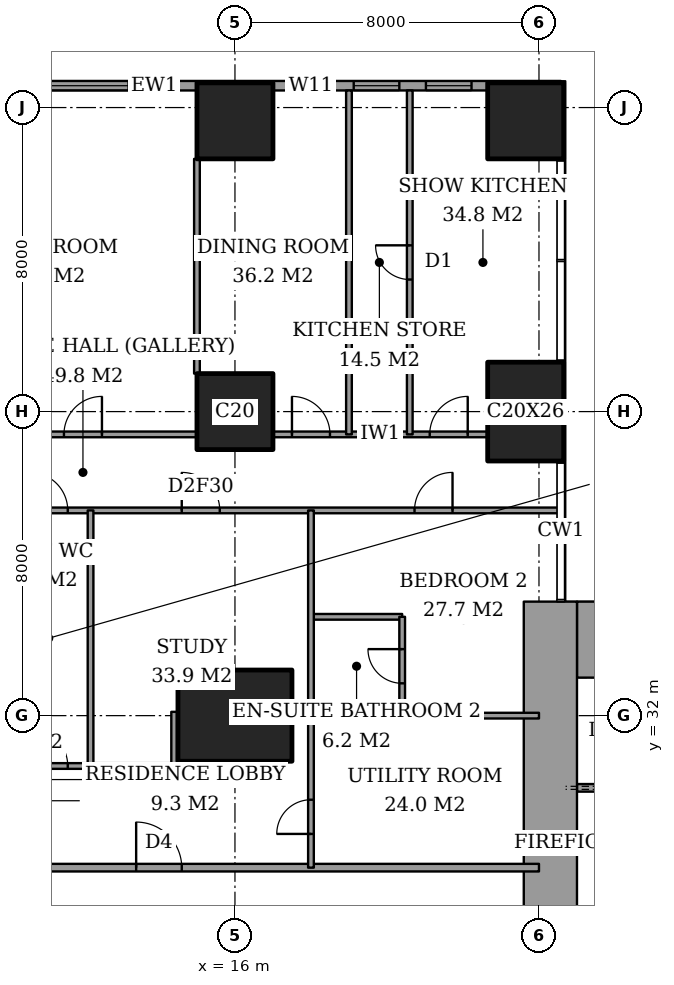
"""IFC4 building model, lengths in metres.
Left out: names, types, materials, properties, quantities, classifications, styles, units other than length and angle.
Written with IfcOpenShell. Run it as: python <this file> out.ifc"""

import sys

from ifc_helpers import new_model, si_unit, direction, frame, frame_2d, origin, origin_2d, place, context, subcontext, project, spatial, rectangle, extrude, element, fill, save


model = new_model("IFC4")
c1 = context("Model", 3, precision=1e-05, world=origin(), true_north=direction((0.0, 1.0)))
c2 = subcontext(c1, "Body", "Model", "MODEL_VIEW")
j1 = project(units=[si_unit("LENGTHUNIT", "METRE"), si_unit("PLANEANGLEUNIT", "RADIAN")], contexts=[c1])
p1 = place(None, origin())
s1 = spatial("IfcSite", under=j1, at=p1, CompositionType="ELEMENT")
p2 = place(p1, origin())
s2 = spatial("IfcBuilding", under=s1, at=p2, CompositionType="ELEMENT")
p3 = place(p2, frame((0.0, 0.0, 139.4)))
s3 = spatial("IfcBuildingStorey", under=s2, at=p3, CompositionType="ELEMENT", Elevation=139.4)
p4 = place(p3, frame((16.0, 32.0, 0.0), z_axis=(0.0, 0.0, 1.0), x_axis=(1.0, 0.0, 0.0)))
e1 = element("IfcColumn", 1, at=p4, inside=s3, PredefinedType="COLUMN", context=c2, shape_type="SweptSolid", body=[
    extrude(rectangle(XDim=3.0, YDim=2.4, at=origin_2d()), origin(), (0.0, 0.0, 1.0), 3.6),
])
for number, where, z_axis, x_axis in (
    (2, (16.0, 40.0, 0.0), (0.0, 0.0, 1.0), (1.0, 0.0, 0.0)),
    (3, (16.0, 47.65, 0.0), (0.0, 0.0, 1.0), (1.0, 0.0, 0.0)),
):
    element("IfcColumn", number, at=place(p3, frame(where, z_axis=z_axis, x_axis=x_axis)), inside=s3, PredefinedType="COLUMN", context=c2, shape_type="SweptSolid", body=[
        extrude(rectangle(XDim=2.0, YDim=2.0, at=origin_2d()), origin(), (0.0, 0.0, 1.0), 3.6),
    ])
p5 = place(p3, frame((23.65, 40.0, 0.0), z_axis=(0.0, 0.0, 1.0), x_axis=(1.0, 0.0, 0.0)))
e4 = element("IfcColumn", 4, at=p5, inside=s3, PredefinedType="COLUMN", context=c2, shape_type="SweptSolid", body=[
    extrude(rectangle(XDim=2.0, YDim=2.6, at=origin_2d()), origin(), (0.0, 0.0, 1.0), 3.6),
])
p6 = place(p3, frame((23.65, 47.65, 0.0), z_axis=(0.0, 0.0, 1.0), x_axis=(1.0, 0.0, 0.0)))
e5 = element("IfcColumn", 5, at=p6, inside=s3, PredefinedType="COLUMN", context=c2, shape_type="SweptSolid", body=[
    extrude(rectangle(XDim=2.0, YDim=2.0, at=origin_2d()), origin(), (0.0, 0.0, 1.0), 3.6),
])
p7 = place(p3, frame((25.0, 34.0, 0.0), z_axis=(0.0, 0.0, 1.0), x_axis=(1.0, 0.0, 0.0)))
e6 = element("IfcWall", 6, at=p7, inside=s3, PredefinedType="SHEAR", context=c2, shape_type="SweptSolid", body=[
    extrude(rectangle(XDim=3.15, YDim=2.0, at=frame_2d((1.575, 0.0))), origin(), (0.0, 0.0, 1.0), 3.6),
])
p8 = place(p3, frame((24.3, 23.15, 0.0), z_axis=(0.0, 0.0, 1.0), x_axis=(0.0, 1.0, 0.0)))
e7 = element("IfcWall", 7, at=p8, inside=s3, PredefinedType="SHEAR", context=c2, shape_type="SweptSolid", body=[
    extrude(rectangle(XDim=11.85, YDim=1.4, at=frame_2d((5.925, 0.0))), origin(), (0.0, 0.0, 1.0), 3.6),
])
p9 = place(p8, frame((0.75, 0.0, 0.0)))
e8 = element("IfcOpeningElement", 8, at=p9, cuts=e7, PredefinedType="OPENING", context=c2, shape_type="SweptSolid", body=[
    extrude(rectangle(XDim=1.8, YDim=2.4, at=frame_2d((0.9, 1.2))), frame((0.0, 0.71, 0.0), z_axis=(0.0, -1.0, 0.0), x_axis=(1.0, 0.0, 0.0)), (0.0, 0.0, 1.0), 1.42),
])
p10 = place(p3, frame((24.575, 48.575, 0.0), z_axis=(0.0, 0.0, 1.0), x_axis=(-1.0, 0.0, 0.0)))
e9 = element("IfcWall", 9, at=p10, inside=s3, PredefinedType="SOLIDWALL", context=c2, shape_type="SweptSolid", body=[
    extrude(rectangle(XDim=21.4, YDim=0.25, at=frame_2d((10.7, 0.0))), origin(), (0.0, 0.0, 1.0), 3.6),
])
p11 = place(p10, frame((2.35, 0.0, 0.4)))
e10 = element("IfcOpeningElement", 10, at=p11, cuts=e9, PredefinedType="OPENING", context=c2, shape_type="SweptSolid", body=[
    extrude(rectangle(XDim=1.2, YDim=2.2, at=frame_2d((0.6, 1.1))), frame((0.0, 0.135, 0.0), z_axis=(0.0, -1.0, 0.0), x_axis=(1.0, 0.0, 0.0)), (0.0, 0.0, 1.0), 0.27),
])
p12 = place(p10, frame((4.25, 0.0, 0.4)))
e11 = element("IfcOpeningElement", 11, at=p12, cuts=e9, PredefinedType="OPENING", context=c2, shape_type="SweptSolid", body=[
    extrude(rectangle(XDim=1.2, YDim=2.2, at=frame_2d((0.6, 1.1))), frame((0.0, 0.135, 0.0), z_axis=(0.0, -1.0, 0.0), x_axis=(1.0, 0.0, 0.0)), (0.0, 0.0, 1.0), 0.27),
])
p13 = place(p10, frame((5.975, 0.0, 0.4)))
e12 = element("IfcOpeningElement", 12, at=p13, cuts=e9, PredefinedType="OPENING", context=c2, shape_type="SweptSolid", body=[
    extrude(rectangle(XDim=1.2, YDim=2.2, at=frame_2d((0.6, 1.1))), frame((0.0, 0.135, 0.0), z_axis=(0.0, -1.0, 0.0), x_axis=(1.0, 0.0, 0.0)), (0.0, 0.0, 1.0), 0.27),
])
p14 = place(p10, frame((11.375, 0.0, 0.4)))
e13 = element("IfcOpeningElement", 13, at=p14, cuts=e9, PredefinedType="OPENING", context=c2, shape_type="SweptSolid", body=[
    extrude(rectangle(XDim=2.4, YDim=2.2, at=frame_2d((1.2, 1.1))), frame((0.0, 0.135, 0.0), z_axis=(0.0, -1.0, 0.0), x_axis=(1.0, 0.0, 0.0)), (0.0, 0.0, 1.0), 0.27),
])
p15 = place(p10, frame((18.225, 0.0, 0.4)))
e14 = element("IfcOpeningElement", 14, at=p15, cuts=e9, PredefinedType="OPENING", context=c2, shape_type="SweptSolid", body=[
    extrude(rectangle(XDim=2.4, YDim=2.2, at=frame_2d((1.2, 1.1))), frame((0.0, 0.135, 0.0), z_axis=(0.0, -1.0, 0.0), x_axis=(1.0, 0.0, 0.0)), (0.0, 0.0, 1.0), 0.27),
])
p16 = place(p3, frame((6.725, 28.0, 0.0), z_axis=(0.0, 0.0, 1.0), x_axis=(1.0, 0.0, 0.0)))
e15 = element("IfcWall", 15, at=p16, inside=s3, PredefinedType="PARTITIONING", context=c2, shape_type="SweptSolid", body=[
    extrude(rectangle(XDim=17.275, YDim=0.2, at=frame_2d((8.637, 0.0))), origin(), (0.0, 0.0, 1.0), 3.35),
])
p17 = place(p16, frame((6.675, 0.0, 0.0)))
e16 = element("IfcOpeningElement", 16, at=p17, cuts=e15, PredefinedType="OPENING", context=c2, shape_type="SweptSolid", body=[
    extrude(rectangle(XDim=1.2, YDim=2.4, at=frame_2d((0.6, 1.2))), frame((0.0, 0.11, 0.0), z_axis=(0.0, -1.0, 0.0), x_axis=(1.0, 0.0, 0.0)), (0.0, 0.0, 1.0), 0.22),
])
p18 = place(p3, frame((10.0, 30.675, 0.0), z_axis=(0.0, 0.0, 1.0), x_axis=(1.0, 0.0, 0.0)))
e17 = element("IfcWall", 17, at=p18, inside=s3, PredefinedType="PARTITIONING", context=c2, shape_type="SweptSolid", body=[
    extrude(rectangle(XDim=4.4, YDim=0.15, at=frame_2d((2.2, 0.0))), origin(), (0.0, 0.0, 1.0), 3.35),
])
p19 = place(p18, frame((0.6, 0.0, 0.0)))
e18 = element("IfcOpeningElement", 18, at=p19, cuts=e17, PredefinedType="OPENING", context=c2, shape_type="SweptSolid", body=[
    extrude(rectangle(XDim=1.0, YDim=2.1, at=frame_2d((0.5, 1.05))), frame((0.0, 0.085, 0.0), z_axis=(0.0, -1.0, 0.0), x_axis=(1.0, 0.0, 0.0)), (0.0, 0.0, 1.0), 0.17),
])
p20 = place(p3, frame((18.0, 32.0, 0.0), z_axis=(0.0, 0.0, 1.0), x_axis=(1.0, 0.0, 0.0)))
e19 = element("IfcWall", 19, at=p20, inside=s3, PredefinedType="PARTITIONING", context=c2, shape_type="SweptSolid", body=[
    extrude(rectangle(XDim=6.0, YDim=0.15, at=frame_2d((3.0, 0.0))), origin(), (0.0, 0.0, 1.0), 2.634),
])
p21 = place(p3, frame((17.5, 32.1, 0.0), z_axis=(0.0, 0.0, 1.0), x_axis=(1.0, 0.0, 0.0)))
e20 = element("IfcWall", 20, at=p21, inside=s3, PredefinedType="PARTITIONING", context=c2, shape_type="SweptSolid", body=[
    extrude(rectangle(XDim=0.5, YDim=0.15, at=frame_2d((0.25, 0.0))), origin(), (0.0, 0.0, 1.0), 2.634),
])
p22 = place(p3, frame((18.0, 34.6, 0.0), z_axis=(0.0, 0.0, 1.0), x_axis=(1.0, 0.0, 0.0)))
e21 = element("IfcWall", 21, at=p22, inside=s3, PredefinedType="PARTITIONING", context=c2, shape_type="SweptSolid", body=[
    extrude(rectangle(XDim=2.4, YDim=0.15, at=frame_2d((1.2, 0.0))), origin(), (0.0, 0.0, 1.0), 3.35),
])
p23 = place(p3, frame((10.0, 37.4, 0.0), z_axis=(0.0, 0.0, 1.0), x_axis=(1.0, 0.0, 0.0)))
e22 = element("IfcWall", 22, at=p23, inside=s3, PredefinedType="PARTITIONING", context=c2, shape_type="SweptSolid", body=[
    extrude(rectangle(XDim=14.561, YDim=0.15, at=frame_2d((7.281, 0.0))), origin(), (0.0, 0.0, 1.0), 3.35),
])
p24 = place(p23, frame((0.6, 0.0, 0.0)))
e23 = element("IfcOpeningElement", 23, at=p24, cuts=e22, PredefinedType="OPENING", context=c2, shape_type="SweptSolid", body=[
    extrude(rectangle(XDim=1.0, YDim=2.1, at=frame_2d((0.5, 1.05))), frame((0.0, 0.085, 0.0), z_axis=(0.0, -1.0, 0.0), x_axis=(1.0, 0.0, 0.0)), (0.0, 0.0, 1.0), 0.17),
])
p25 = place(p23, frame((4.6, 0.0, 0.0)))
e24 = element("IfcOpeningElement", 24, at=p25, cuts=e22, PredefinedType="OPENING", context=c2, shape_type="SweptSolid", body=[
    extrude(rectangle(XDim=1.0, YDim=2.1, at=frame_2d((0.5, 1.05))), frame((0.0, 0.085, 0.0), z_axis=(0.0, -1.0, 0.0), x_axis=(1.0, 0.0, 0.0)), (0.0, 0.0, 1.0), 0.17),
])
p26 = place(p23, frame((10.725, 0.0, 0.0)))
e25 = element("IfcOpeningElement", 25, at=p26, cuts=e22, PredefinedType="OPENING", context=c2, shape_type="SweptSolid", body=[
    extrude(rectangle(XDim=1.0, YDim=2.1, at=frame_2d((0.5, 1.05))), frame((0.0, 0.085, 0.0), z_axis=(0.0, -1.0, 0.0), x_axis=(1.0, 0.0, 0.0)), (0.0, 0.0, 1.0), 0.17),
])
p27 = place(p3, frame((9.0, 39.4, 0.0), z_axis=(0.0, 0.0, 1.0), x_axis=(1.0, 0.0, 0.0)))
e26 = element("IfcWall", 26, at=p27, inside=s3, PredefinedType="PARTITIONING", context=c2, shape_type="SweptSolid", body=[
    extrude(rectangle(XDim=6.0, YDim=0.15, at=frame_2d((3.0, 0.0))), origin(), (0.0, 0.0, 1.0), 3.35),
])
p28 = place(p27, frame((2.5, 0.0, 0.0)))
e27 = element("IfcOpeningElement", 27, at=p28, cuts=e26, PredefinedType="OPENING", context=c2, shape_type="SweptSolid", body=[
    extrude(rectangle(XDim=1.0, YDim=2.1, at=frame_2d((0.5, 1.05))), frame((0.0, 0.085, 0.0), z_axis=(0.0, -1.0, 0.0), x_axis=(1.0, 0.0, 0.0)), (0.0, 0.0, 1.0), 0.17),
])
p29 = place(p3, frame((17.0, 39.4, 0.0), z_axis=(0.0, 0.0, 1.0), x_axis=(1.0, 0.0, 0.0)))
e28 = element("IfcWall", 28, at=p29, inside=s3, PredefinedType="PARTITIONING", context=c2, shape_type="SweptSolid", body=[
    extrude(rectangle(XDim=5.65, YDim=0.15, at=frame_2d((2.825, 0.0))), origin(), (0.0, 0.0, 1.0), 3.35),
])
p30 = place(p29, frame((0.5, 0.0, 0.0)))
e29 = element("IfcOpeningElement", 29, at=p30, cuts=e28, PredefinedType="OPENING", context=c2, shape_type="SweptSolid", body=[
    extrude(rectangle(XDim=1.0, YDim=2.1, at=frame_2d((0.5, 1.05))), frame((0.0, 0.085, 0.0), z_axis=(0.0, -1.0, 0.0), x_axis=(1.0, 0.0, 0.0)), (0.0, 0.0, 1.0), 0.17),
])
p31 = place(p29, frame((4.125, 0.0, 0.0)))
e30 = element("IfcOpeningElement", 30, at=p31, cuts=e28, PredefinedType="OPENING", context=c2, shape_type="SweptSolid", body=[
    extrude(rectangle(XDim=1.0, YDim=2.1, at=frame_2d((0.5, 1.05))), frame((0.0, 0.085, 0.0), z_axis=(0.0, -1.0, 0.0), x_axis=(1.0, 0.0, 0.0)), (0.0, 0.0, 1.0), 0.17),
])
p32 = place(p3, frame((12.2, 30.675, 0.0), z_axis=(0.0, 0.0, 1.0), x_axis=(0.0, 1.0, 0.0)))
e31 = element("IfcWall", 31, at=p32, inside=s3, PredefinedType="PARTITIONING", context=c2, shape_type="SweptSolid", body=[
    extrude(rectangle(XDim=6.725, YDim=0.15, at=frame_2d((3.362, 0.0))), origin(), (0.0, 0.0, 1.0), 3.35),
])
p33 = place(p3, frame((14.4, 30.675, 0.0), z_axis=(0.0, 0.0, 1.0), x_axis=(0.0, 1.0, 0.0)))
e32 = element("IfcWall", 32, at=p33, inside=s3, PredefinedType="PARTITIONING", context=c2, shape_type="SweptSolid", body=[
    extrude(rectangle(XDim=1.425, YDim=0.15, at=frame_2d((0.712, 0.0))), origin(), (0.0, 0.0, 1.0), 3.35),
])
p34 = place(p3, frame((15.0, 41.0, 0.0), z_axis=(0.0, 0.0, 1.0), x_axis=(0.0, 1.0, 0.0)))
e33 = element("IfcWall", 33, at=p34, inside=s3, PredefinedType="PARTITIONING", context=c2, shape_type="SweptSolid", body=[
    extrude(rectangle(XDim=5.65, YDim=0.15, at=frame_2d((2.825, 0.0))), origin(), (0.0, 0.0, 1.0), 3.35),
])
p35 = place(p3, frame((18.0, 28.0, 0.0), z_axis=(0.0, 0.0, 1.0), x_axis=(0.0, 1.0, 0.0)))
e34 = element("IfcWall", 34, at=p35, inside=s3, PredefinedType="PARTITIONING", context=c2, shape_type="SweptSolid", body=[
    extrude(rectangle(XDim=9.4, YDim=0.15, at=frame_2d((4.7, 0.0))), origin(), (0.0, 0.0, 1.0), 3.35),
])
p36 = place(p35, frame((0.887, 0.0, 0.0)))
e35 = element("IfcOpeningElement", 35, at=p36, cuts=e34, PredefinedType="OPENING", context=c2, shape_type="SweptSolid", body=[
    extrude(rectangle(XDim=0.9, YDim=2.1, at=frame_2d((0.45, 1.05))), frame((0.0, 0.085, 0.0), z_axis=(0.0, -1.0, 0.0), x_axis=(1.0, 0.0, 0.0)), (0.0, 0.0, 1.0), 0.17),
])
p37 = place(p3, frame((19.0, 39.4, 0.0), z_axis=(0.0, 0.0, 1.0), x_axis=(0.0, 1.0, 0.0)))
e36 = element("IfcWall", 36, at=p37, inside=s3, PredefinedType="PARTITIONING", context=c2, shape_type="SweptSolid", body=[
    extrude(rectangle(XDim=9.05, YDim=0.15, at=frame_2d((4.525, 0.0))), origin(), (0.0, 0.0, 1.0), 3.35),
])
p38 = place(p3, frame((20.4, 32.0, 0.0), z_axis=(0.0, 0.0, 1.0), x_axis=(0.0, 1.0, 0.0)))
e37 = element("IfcWall", 37, at=p38, inside=s3, PredefinedType="PARTITIONING", context=c2, shape_type="SweptSolid", body=[
    extrude(rectangle(XDim=2.6, YDim=0.15, at=frame_2d((1.3, 0.0))), origin(), (0.0, 0.0, 1.0), 3.35),
])
p39 = place(p38, frame((0.85, 0.0, 0.0)))
e38 = element("IfcOpeningElement", 38, at=p39, cuts=e37, PredefinedType="OPENING", context=c2, shape_type="SweptSolid", body=[
    extrude(rectangle(XDim=0.9, YDim=2.1, at=frame_2d((0.45, 1.05))), frame((0.0, 0.085, 0.0), z_axis=(0.0, -1.0, 0.0), x_axis=(1.0, 0.0, 0.0)), (0.0, 0.0, 1.0), 0.17),
])
p40 = place(p3, frame((20.6, 39.4, 0.0), z_axis=(0.0, 0.0, 1.0), x_axis=(0.0, 1.0, 0.0)))
e39 = element("IfcWall", 39, at=p40, inside=s3, PredefinedType="PARTITIONING", context=c2, shape_type="SweptSolid", body=[
    extrude(rectangle(XDim=9.05, YDim=0.15, at=frame_2d((4.525, 0.0))), origin(), (0.0, 0.0, 1.0), 3.35),
])
p41 = place(p40, frame((4.075, 0.0, 0.0)))
e40 = element("IfcOpeningElement", 40, at=p41, cuts=e39, PredefinedType="OPENING", context=c2, shape_type="SweptSolid", body=[
    extrude(rectangle(XDim=0.9, YDim=2.1, at=frame_2d((0.45, 1.05))), frame((0.0, 0.085, 0.0), z_axis=(0.0, -1.0, 0.0), x_axis=(1.0, 0.0, 0.0)), (0.0, 0.0, 1.0), 0.17),
])
p42 = place(p3, frame((25.0, 30.1, 0.0), z_axis=(0.0, 0.0, 1.0), x_axis=(1.0, 0.0, 0.0)))
e41 = element("IfcWall", 41, at=p42, inside=s3, PredefinedType="PARTITIONING", context=c2, shape_type="SweptSolid", body=[
    extrude(rectangle(XDim=12.7, YDim=0.2, at=frame_2d((6.35, 0.0))), origin(), (0.0, 0.0, 1.0), 3.6),
])
p43 = place(p42, frame((0.9, 0.0, 0.0)))
e42 = element("IfcOpeningElement", 42, at=p43, cuts=e41, PredefinedType="OPENING", context=c2, shape_type="SweptSolid", body=[
    extrude(rectangle(XDim=1.2, YDim=2.1, at=frame_2d((0.6, 1.05))), frame((0.0, 0.11, 0.0), z_axis=(0.0, -1.0, 0.0), x_axis=(1.0, 0.0, 0.0)), (0.0, 0.0, 1.0), 0.22),
])
p44 = place(p11, origin())
e43 = element("IfcWindow", 43, at=p44, inside=s3, PartitioningType="SINGLE_PANEL", PredefinedType="WINDOW", context=c2, shape_type="SweptSolid", body=[
    extrude(rectangle(XDim=1.2, YDim=2.2, at=frame_2d((0.6, 1.1))), frame((0.0, 0.03, 0.0), z_axis=(0.0, -1.0, 0.0), x_axis=(1.0, 0.0, 0.0)), (0.0, 0.0, 1.0), 0.06),
])
fill(e10, e43)
p45 = place(p12, origin())
e44 = element("IfcWindow", 44, at=p45, inside=s3, PartitioningType="SINGLE_PANEL", PredefinedType="WINDOW", context=c2, shape_type="SweptSolid", body=[
    extrude(rectangle(XDim=1.2, YDim=2.2, at=frame_2d((0.6, 1.1))), frame((0.0, 0.03, 0.0), z_axis=(0.0, -1.0, 0.0), x_axis=(1.0, 0.0, 0.0)), (0.0, 0.0, 1.0), 0.06),
])
fill(e11, e44)
p46 = place(p13, origin())
e45 = element("IfcWindow", 45, at=p46, inside=s3, PartitioningType="SINGLE_PANEL", PredefinedType="WINDOW", context=c2, shape_type="SweptSolid", body=[
    extrude(rectangle(XDim=1.2, YDim=2.2, at=frame_2d((0.6, 1.1))), frame((0.0, 0.03, 0.0), z_axis=(0.0, -1.0, 0.0), x_axis=(1.0, 0.0, 0.0)), (0.0, 0.0, 1.0), 0.06),
])
fill(e12, e45)
p47 = place(p14, origin())
e46 = element("IfcWindow", 46, at=p47, inside=s3, PartitioningType="SINGLE_PANEL", PredefinedType="WINDOW", context=c2, shape_type="SweptSolid", body=[
    extrude(rectangle(XDim=2.4, YDim=2.2, at=frame_2d((1.2, 1.1))), frame((0.0, 0.03, 0.0), z_axis=(0.0, -1.0, 0.0), x_axis=(1.0, 0.0, 0.0)), (0.0, 0.0, 1.0), 0.06),
])
fill(e13, e46)
p48 = place(p28, origin())
e47 = element("IfcDoor", 47, at=p48, inside=s3, OperationType="SINGLE_SWING_LEFT", PredefinedType="DOOR", context=c2, shape_type="SweptSolid", body=[
    extrude(rectangle(XDim=1.0, YDim=2.1, at=frame_2d((0.5, 1.05))), frame((0.0, 0.025, 0.0), z_axis=(0.0, -1.0, 0.0), x_axis=(1.0, 0.0, 0.0)), (0.0, 0.0, 1.0), 0.05),
])
fill(e27, e47)
p49 = place(p30, origin())
e48 = element("IfcDoor", 48, at=p49, inside=s3, OperationType="SINGLE_SWING_RIGHT", PredefinedType="DOOR", context=c2, shape_type="SweptSolid", body=[
    extrude(rectangle(XDim=1.0, YDim=2.1, at=frame_2d((0.5, 1.05))), frame((0.0, 0.025, 0.0), z_axis=(0.0, -1.0, 0.0), x_axis=(1.0, 0.0, 0.0)), (0.0, 0.0, 1.0), 0.05),
])
fill(e29, e48)
p50 = place(p41, origin())
e49 = element("IfcDoor", 49, at=p50, inside=s3, OperationType="SINGLE_SWING_LEFT", PredefinedType="DOOR", context=c2, shape_type="SweptSolid", body=[
    extrude(rectangle(XDim=0.9, YDim=2.1, at=frame_2d((0.45, 1.05))), frame((0.0, 0.025, 0.0), z_axis=(0.0, -1.0, 0.0), x_axis=(1.0, 0.0, 0.0)), (0.0, 0.0, 1.0), 0.05),
])
fill(e40, e49)
p51 = place(p31, origin())
e50 = element("IfcDoor", 50, at=p51, inside=s3, OperationType="SINGLE_SWING_LEFT", PredefinedType="DOOR", context=c2, shape_type="SweptSolid", body=[
    extrude(rectangle(XDim=1.0, YDim=2.1, at=frame_2d((0.5, 1.05))), frame((0.0, 0.025, 0.0), z_axis=(0.0, -1.0, 0.0), x_axis=(1.0, 0.0, 0.0)), (0.0, 0.0, 1.0), 0.05),
])
fill(e30, e50)
p52 = place(p24, origin())
e51 = element("IfcDoor", 51, at=p52, inside=s3, OperationType="SINGLE_SWING_RIGHT", PredefinedType="DOOR", context=c2, shape_type="SweptSolid", body=[
    extrude(rectangle(XDim=1.0, YDim=2.1, at=frame_2d((0.5, 1.05))), frame((0.0, 0.025, 0.0), z_axis=(0.0, -1.0, 0.0), x_axis=(1.0, 0.0, 0.0)), (0.0, 0.0, 1.0), 0.05),
])
fill(e23, e51)
p53 = place(p17, origin())
e52 = element("IfcDoor", 52, at=p53, inside=s3, OperationType="SINGLE_SWING_RIGHT", PredefinedType="DOOR", context=c2, shape_type="SweptSolid", body=[
    extrude(rectangle(XDim=1.2, YDim=2.4, at=frame_2d((0.6, 1.2))), frame((0.0, 0.025, 0.0), z_axis=(0.0, -1.0, 0.0), x_axis=(1.0, 0.0, 0.0)), (0.0, 0.0, 1.0), 0.05),
])
fill(e16, e52)
p54 = place(p19, origin())
e53 = element("IfcDoor", 53, at=p54, inside=s3, OperationType="SINGLE_SWING_RIGHT", PredefinedType="DOOR", context=c2, shape_type="SweptSolid", body=[
    extrude(rectangle(XDim=1.0, YDim=2.1, at=frame_2d((0.5, 1.05))), frame((0.0, 0.025, 0.0), z_axis=(0.0, -1.0, 0.0), x_axis=(1.0, 0.0, 0.0)), (0.0, 0.0, 1.0), 0.05),
])
fill(e18, e53)
p55 = place(p25, origin())
e54 = element("IfcDoor", 54, at=p55, inside=s3, OperationType="SINGLE_SWING_RIGHT", PredefinedType="DOOR", context=c2, shape_type="SweptSolid", body=[
    extrude(rectangle(XDim=1.0, YDim=2.1, at=frame_2d((0.5, 1.05))), frame((0.0, 0.025, 0.0), z_axis=(0.0, -1.0, 0.0), x_axis=(1.0, 0.0, 0.0)), (0.0, 0.0, 1.0), 0.05),
])
fill(e24, e54)
p56 = place(p39, origin())
e55 = element("IfcDoor", 55, at=p56, inside=s3, OperationType="SINGLE_SWING_LEFT", PredefinedType="DOOR", context=c2, shape_type="SweptSolid", body=[
    extrude(rectangle(XDim=0.9, YDim=2.1, at=frame_2d((0.45, 1.05))), frame((0.0, 0.025, 0.0), z_axis=(0.0, -1.0, 0.0), x_axis=(1.0, 0.0, 0.0)), (0.0, 0.0, 1.0), 0.05),
])
fill(e38, e55)
p57 = place(p26, origin())
e56 = element("IfcDoor", 56, at=p57, inside=s3, OperationType="SINGLE_SWING_LEFT", PredefinedType="DOOR", context=c2, shape_type="SweptSolid", body=[
    extrude(rectangle(XDim=1.0, YDim=2.1, at=frame_2d((0.5, 1.05))), frame((0.0, 0.025, 0.0), z_axis=(0.0, -1.0, 0.0), x_axis=(1.0, 0.0, 0.0)), (0.0, 0.0, 1.0), 0.05),
])
fill(e25, e56)
p58 = place(p36, origin())
e57 = element("IfcDoor", 57, at=p58, inside=s3, OperationType="SINGLE_SWING_RIGHT", PredefinedType="DOOR", context=c2, shape_type="SweptSolid", body=[
    extrude(rectangle(XDim=0.9, YDim=2.1, at=frame_2d((0.45, 1.05))), frame((0.0, 0.025, 0.0), z_axis=(0.0, -1.0, 0.0), x_axis=(1.0, 0.0, 0.0)), (0.0, 0.0, 1.0), 0.05),
])
fill(e35, e57)
save(model, sys.argv[1])
